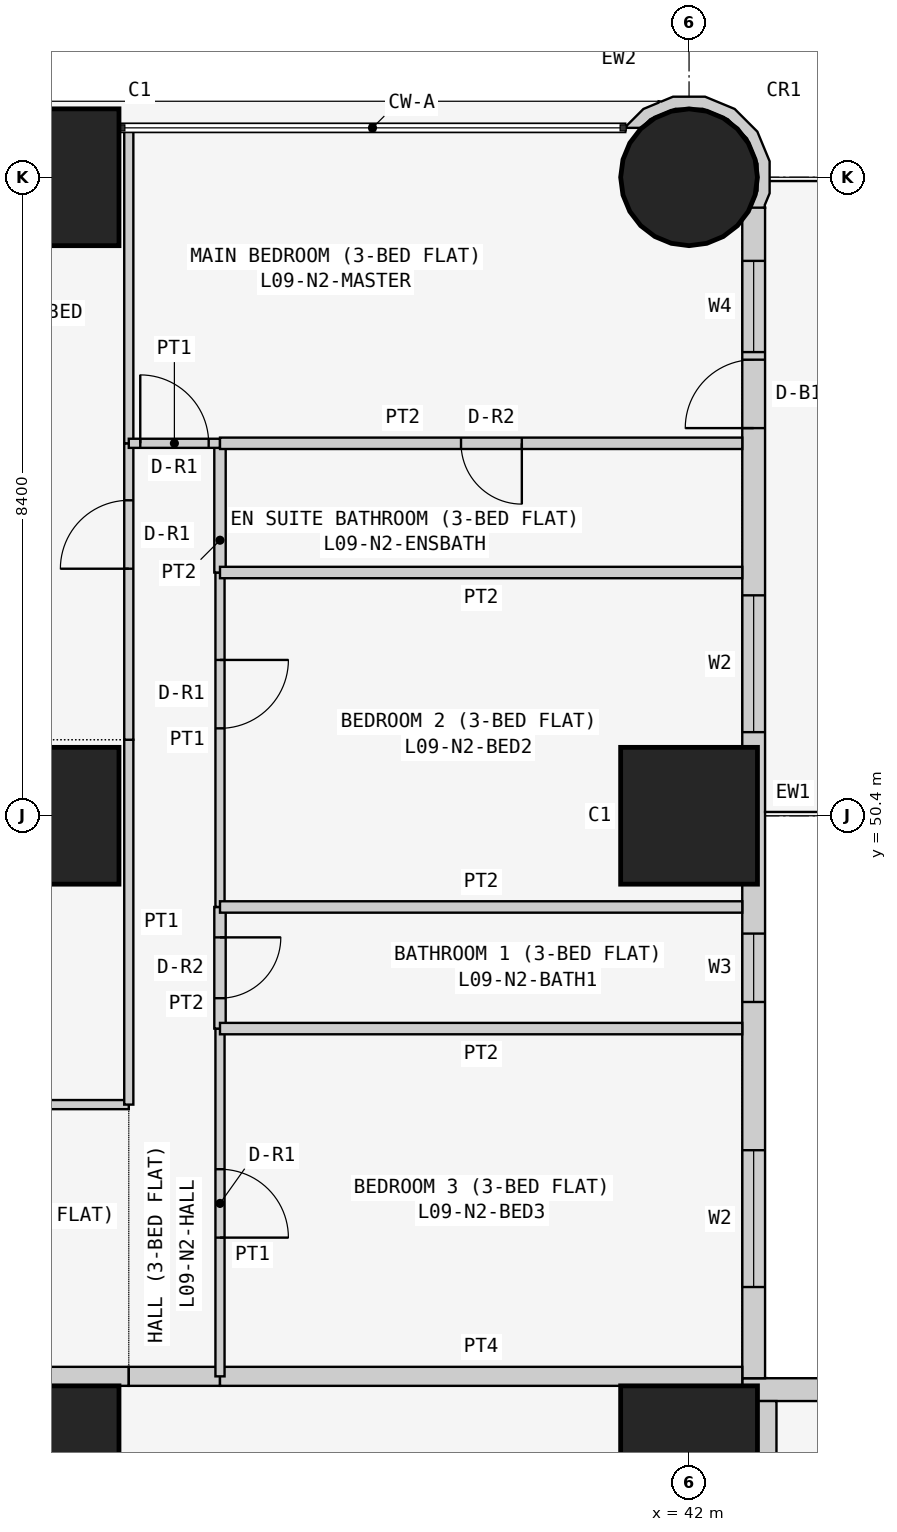
"""IFC4 building model, lengths in metres.
Left out: names, types, materials, properties, quantities, classifications, styles, units other than length and angle.
Written with IfcOpenShell. Run it as: python <this file> out.ifc"""

import sys

from ifc_helpers import new_model, si_unit, direction, frame, frame_2d, origin, origin_2d, place, context, subcontext, project, spatial, polyline, rectangle, circle, outline, extrude, element, fill, save


model = new_model("IFC4")
c1 = context("Model", 3, precision=1e-05, world=origin(), true_north=direction((0.0, 1.0)))
c2 = subcontext(c1, "Body", "Model", "MODEL_VIEW")
j1 = project(units=[si_unit("LENGTHUNIT", "METRE"), si_unit("PLANEANGLEUNIT", "RADIAN")], contexts=[c1])
p1 = place(None, origin())
s1 = spatial("IfcSite", under=j1, at=p1, CompositionType="ELEMENT")
p2 = place(p1, origin())
s2 = spatial("IfcBuilding", under=s1, at=p2, CompositionType="ELEMENT")
p3 = place(p2, frame((0.0, 0.0, 41.7)))
s3 = spatial("IfcBuildingStorey", under=s2, at=p3, CompositionType="ELEMENT", Elevation=41.7)
for number, where, z_axis, x_axis in (
    (1, (33.6, 42.0, 0.0), (0.0, 0.0, 1.0), (1.0, 0.0, 0.0)),
    (2, (33.6, 50.4, 0.0), (0.0, 0.0, 1.0), (1.0, 0.0, 0.0)),
    (3, (33.6, 58.8, 0.0), (0.0, 0.0, 1.0), (1.0, 0.0, 0.0)),
    (4, (42.0, 42.0, 0.0), (0.0, 0.0, 1.0), (1.0, 0.0, 0.0)),
    (5, (42.0, 50.4, 0.0), (0.0, 0.0, 1.0), (1.0, 0.0, 0.0)),
):
    element("IfcColumn", number, at=place(p3, frame(where, z_axis=z_axis, x_axis=x_axis)), inside=s3, PredefinedType="COLUMN", context=c2, shape_type="SweptSolid", body=[
        extrude(rectangle(XDim=1.8, YDim=1.8, at=origin_2d()), origin(), (0.0, 0.0, 1.0), 3.6),
    ])
p4 = place(p3, frame((42.0, 58.8, 0.0), z_axis=(0.0, 0.0, 1.0), x_axis=(1.0, 0.0, 0.0)))
e6 = element("IfcColumn", 6, at=p4, inside=s3, PredefinedType="COLUMN", context=c2, shape_type="SweptSolid", body=[
    extrude(circle(Radius=0.9, at=origin_2d()), origin(), (0.0, 0.0, 1.0), 3.6),
])
p5 = place(p3, frame((58.4, 42.85, 0.0), z_axis=(0.0, 0.0, 1.0), x_axis=(-1.0, 0.0, 0.0)))
e7 = element("IfcWall", 7, at=p5, inside=s3, PredefinedType="SOLIDWALL", context=c2, shape_type="SweptSolid", body=[
    extrude(rectangle(XDim=15.7, YDim=0.3, at=frame_2d((7.85, 0.0))), origin(), (0.0, 0.0, 1.0), 3.45),
])
p6 = place(p5, frame((12.4, 0.0, 0.9)))
e8 = element("IfcOpeningElement", 8, at=p6, cuts=e7, PredefinedType="OPENING", context=c2, shape_type="SweptSolid", body=[
    extrude(rectangle(XDim=1.8, YDim=1.5, at=frame_2d((0.9, 0.75))), frame((0.0, 0.16, 0.0), z_axis=(0.0, -1.0, 0.0), x_axis=(1.0, 0.0, 0.0)), (0.0, 0.0, 1.0), 0.32),
])
p7 = place(p5, frame((9.55, 0.0, 1.5)))
e9 = element("IfcOpeningElement", 9, at=p7, cuts=e7, PredefinedType="OPENING", context=c2, shape_type="SweptSolid", body=[
    extrude(rectangle(XDim=0.9, YDim=0.7, at=frame_2d((0.45, 0.35))), frame((0.0, 0.16, 0.0), z_axis=(0.0, -1.0, 0.0), x_axis=(1.0, 0.0, 0.0)), (0.0, 0.0, 1.0), 0.32),
])
p8 = place(p5, frame((5.1, 0.0, 0.9)))
e10 = element("IfcOpeningElement", 10, at=p8, cuts=e7, PredefinedType="OPENING", context=c2, shape_type="SweptSolid", body=[
    extrude(rectangle(XDim=1.8, YDim=1.5, at=frame_2d((0.9, 0.75))), frame((0.0, 0.16, 0.0), z_axis=(0.0, -1.0, 0.0), x_axis=(1.0, 0.0, 0.0)), (0.0, 0.0, 1.0), 0.32),
])
p9 = place(p5, frame((2.0, 0.0, 0.0)))
e11 = element("IfcOpeningElement", 11, at=p9, cuts=e7, PredefinedType="OPENING", context=c2, shape_type="SweptSolid", body=[
    extrude(rectangle(XDim=0.9, YDim=2.4, at=frame_2d((0.45, 1.2))), frame((0.0, 0.16, 0.0), z_axis=(0.0, -1.0, 0.0), x_axis=(1.0, 0.0, 0.0)), (0.0, 0.0, 1.0), 0.32),
])
p10 = place(p5, frame((0.7, 0.0, 0.9)))
e12 = element("IfcOpeningElement", 12, at=p10, cuts=e7, PredefinedType="OPENING", context=c2, shape_type="SweptSolid", body=[
    extrude(rectangle(XDim=1.2, YDim=1.5, at=frame_2d((0.6, 0.75))), frame((0.0, 0.16, 0.0), z_axis=(0.0, -1.0, 0.0), x_axis=(1.0, 0.0, 0.0)), (0.0, 0.0, 1.0), 0.32),
])
p11 = place(p3, frame((42.85, 43.0, 0.0), z_axis=(0.0, 0.0, 1.0), x_axis=(0.0, 1.0, 0.0)))
e13 = element("IfcWall", 13, at=p11, inside=s3, PredefinedType="SOLIDWALL", context=c2, shape_type="SweptSolid", body=[
    extrude(rectangle(XDim=15.4, YDim=0.3, at=frame_2d((7.7, 0.0))), origin(), (0.0, 0.0, 1.0), 3.45),
])
p12 = place(p11, frame((1.2, 0.0, 0.9)))
e14 = element("IfcOpeningElement", 14, at=p12, cuts=e13, PredefinedType="OPENING", context=c2, shape_type="SweptSolid", body=[
    extrude(rectangle(XDim=1.8, YDim=1.5, at=frame_2d((0.9, 0.75))), frame((0.0, 0.16, 0.0), z_axis=(0.0, -1.0, 0.0), x_axis=(1.0, 0.0, 0.0)), (0.0, 0.0, 1.0), 0.32),
])
p13 = place(p11, frame((4.95, 0.0, 1.5)))
e15 = element("IfcOpeningElement", 15, at=p13, cuts=e13, PredefinedType="OPENING", context=c2, shape_type="SweptSolid", body=[
    extrude(rectangle(XDim=0.9, YDim=0.7, at=frame_2d((0.45, 0.35))), frame((0.0, 0.16, 0.0), z_axis=(0.0, -1.0, 0.0), x_axis=(1.0, 0.0, 0.0)), (0.0, 0.0, 1.0), 0.32),
])
p14 = place(p11, frame((8.5, 0.0, 0.9)))
e16 = element("IfcOpeningElement", 16, at=p14, cuts=e13, PredefinedType="OPENING", context=c2, shape_type="SweptSolid", body=[
    extrude(rectangle(XDim=1.8, YDim=1.5, at=frame_2d((0.9, 0.75))), frame((0.0, 0.16, 0.0), z_axis=(0.0, -1.0, 0.0), x_axis=(1.0, 0.0, 0.0)), (0.0, 0.0, 1.0), 0.32),
])
p15 = place(p11, frame((12.5, 0.0, 0.0)))
e17 = element("IfcOpeningElement", 17, at=p15, cuts=e13, PredefinedType="OPENING", context=c2, shape_type="SweptSolid", body=[
    extrude(rectangle(XDim=0.9, YDim=2.4, at=frame_2d((0.45, 1.2))), frame((0.0, 0.16, 0.0), z_axis=(0.0, -1.0, 0.0), x_axis=(1.0, 0.0, 0.0)), (0.0, 0.0, 1.0), 0.32),
])
p16 = place(p11, frame((13.5, 0.0, 0.9)))
e18 = element("IfcOpeningElement", 18, at=p16, cuts=e13, PredefinedType="OPENING", context=c2, shape_type="SweptSolid", body=[
    extrude(rectangle(XDim=1.2, YDim=1.5, at=frame_2d((0.6, 0.75))), frame((0.0, 0.16, 0.0), z_axis=(0.0, -1.0, 0.0), x_axis=(1.0, 0.0, 0.0)), (0.0, 0.0, 1.0), 0.32),
])
p17 = place(p3, frame((42.91, 58.436, 0.0), z_axis=(0.0, 0.0, 1.0), x_axis=(0.377204953059, 0.926129809145, 0.0)))
e19 = element("IfcWall", 19, at=p17, inside=s3, PredefinedType="SOLIDWALL", context=c2, shape_type="SweptSolid", body=[
    extrude(outline(polyline([(0.769, 1.728), (0.75, 1.723), (0.6, 1.875), (0.295, 2.004), (0.281, 1.998), (0.36, 1.803), (0.509, 1.741), (0.761, 1.486), (0.896, 1.154), (0.894, 0.795), (0.755, 0.465), (0.5, 0.213), (0.168, 0.078), (-0.1, 0.08), (0.001, -0.097), (0.03, -0.08), (0.198, -0.081), (0.589, 0.078), (0.889, 0.374), (1.052, 0.763), (1.055, 1.185), (0.896, 1.575), (0.778, 1.695), (0.769, 1.728)])), origin(), (0.0, 0.0, 1.0), 3.45),
])
p18 = place(p3, frame((29.4, 43.025, 0.0), z_axis=(0.0, 0.0, 1.0), x_axis=(1.0, 0.0, 0.0)))
e20 = element("IfcWall", 20, at=p18, inside=s3, PredefinedType="PARTITIONING", context=c2, shape_type="SweptSolid", body=[
    extrude(rectangle(XDim=5.229, YDim=0.25, at=frame_2d((2.615, 0.0))), origin(), (0.0, 0.0, 1.0), 3.45),
])
p19 = place(p18, frame((2.1, 0.0, 0.0)))
e21 = element("IfcOpeningElement", 21, at=p19, cuts=e20, PredefinedType="OPENING", context=c2, shape_type="SweptSolid", body=[
    extrude(rectangle(XDim=1.0, YDim=2.1, at=frame_2d((0.5, 1.05))), frame((0.0, 0.135, 0.0), z_axis=(0.0, -1.0, 0.0), x_axis=(1.0, 0.0, 0.0)), (0.0, 0.0, 1.0), 0.27),
])
p20 = place(p3, frame((34.629, 43.025, 0.0), z_axis=(0.0, 0.0, 1.0), x_axis=(1.0, 0.0, 0.0)))
e22 = element("IfcWall", 22, at=p20, inside=s3, PredefinedType="PARTITIONING", context=c2, shape_type="SweptSolid", body=[
    extrude(rectangle(XDim=1.2, YDim=0.25, at=frame_2d((0.6, 0.0))), origin(), (0.0, 0.0, 1.0), 3.45),
])
for number, where, z_axis, x_axis in (
    (23, (35.829, 43.025, 0.0), (0.0, 0.0, 1.0), (1.0, 0.0, 0.0)),
    (24, (43.025, 42.7, 0.0), (0.0, 0.0, 1.0), (0.0, -1.0, 0.0)),
):
    element("IfcWall", number, at=place(p3, frame(where, z_axis=z_axis, x_axis=x_axis)), inside=s3, PredefinedType="PARTITIONING", context=c2, shape_type="SweptSolid", body=[
        extrude(rectangle(XDim=6.871, YDim=0.25, at=frame_2d((3.436, 0.0))), origin(), (0.0, 0.0, 1.0), 3.45),
    ])
p21 = place(p3, frame((29.4, 46.6, 0.0), z_axis=(0.0, 0.0, 1.0), x_axis=(1.0, 0.0, 0.0)))
e25 = element("IfcWall", 25, at=p21, inside=s3, PredefinedType="PARTITIONING", context=c2, shape_type="SweptSolid", body=[
    extrude(rectangle(XDim=5.229, YDim=0.12, at=frame_2d((2.615, 0.0))), origin(), (0.0, 0.0, 1.0), 3.45),
])
p22 = place(p21, frame((1.05, 0.0, 0.0)))
e26 = element("IfcOpeningElement", 26, at=p22, cuts=e25, PredefinedType="OPENING", context=c2, shape_type="SweptSolid", body=[
    extrude(rectangle(XDim=0.9, YDim=2.1, at=frame_2d((0.45, 1.05))), frame((0.0, 0.07, 0.0), z_axis=(0.0, -1.0, 0.0), x_axis=(1.0, 0.0, 0.0)), (0.0, 0.0, 1.0), 0.14),
])
p23 = place(p3, frame((34.629, 51.4, 0.0), z_axis=(0.0, 0.0, 1.0), x_axis=(0.0, -1.0, 0.0)))
e27 = element("IfcWall", 27, at=p23, inside=s3, PredefinedType="PARTITIONING", context=c2, shape_type="SweptSolid", body=[
    extrude(rectangle(XDim=4.8, YDim=0.12, at=frame_2d((2.4, 0.0))), origin(), (0.0, 0.0, 1.0), 3.45),
])
p24 = place(p3, frame((34.629, 55.3, 0.0), z_axis=(0.0, 0.0, 1.0), x_axis=(0.0, -1.0, 0.0)))
e28 = element("IfcWall", 28, at=p24, inside=s3, PredefinedType="PARTITIONING", context=c2, shape_type="SweptSolid", body=[
    extrude(rectangle(XDim=3.9, YDim=0.12, at=frame_2d((1.95, 0.0))), origin(), (0.0, 0.0, 1.0), 3.45),
])
p25 = place(p24, frame((0.75, 0.0, 0.0)))
e29 = element("IfcOpeningElement", 29, at=p25, cuts=e28, PredefinedType="OPENING", context=c2, shape_type="SweptSolid", body=[
    extrude(rectangle(XDim=0.9, YDim=2.1, at=frame_2d((0.45, 1.05))), frame((0.0, 0.07, 0.0), z_axis=(0.0, -1.0, 0.0), x_axis=(1.0, 0.0, 0.0)), (0.0, 0.0, 1.0), 0.14),
])
p26 = place(p3, frame((34.629, 59.45, 0.0), z_axis=(0.0, 0.0, 1.0), x_axis=(0.0, -1.0, 0.0)))
e30 = element("IfcWall", 30, at=p26, inside=s3, PredefinedType="PARTITIONING", context=c2, shape_type="SweptSolid", body=[
    extrude(rectangle(XDim=4.15, YDim=0.12, at=frame_2d((2.075, 0.0))), origin(), (0.0, 0.0, 1.0), 3.45),
])
p27 = place(p3, frame((35.829, 47.6, 0.0), z_axis=(0.0, 0.0, 1.0), x_axis=(0.0, -1.0, 0.0)))
e31 = element("IfcWall", 31, at=p27, inside=s3, PredefinedType="PARTITIONING", context=c2, shape_type="SweptSolid", body=[
    extrude(rectangle(XDim=4.575, YDim=0.12, at=frame_2d((2.288, 0.0))), origin(), (0.0, 0.0, 1.0), 3.45),
])
p28 = place(p27, frame((1.85, 0.0, 0.0)))
e32 = element("IfcOpeningElement", 32, at=p28, cuts=e31, PredefinedType="OPENING", context=c2, shape_type="SweptSolid", body=[
    extrude(rectangle(XDim=0.9, YDim=2.1, at=frame_2d((0.45, 1.05))), frame((0.0, 0.07, 0.0), z_axis=(0.0, -1.0, 0.0), x_axis=(1.0, 0.0, 0.0)), (0.0, 0.0, 1.0), 0.14),
])
p29 = place(p3, frame((35.829, 49.2, 0.0), z_axis=(0.0, 0.0, 1.0), x_axis=(0.0, -1.0, 0.0)))
e33 = element("IfcWall", 33, at=p29, inside=s3, PredefinedType="PARTITIONING", context=c2, shape_type="SweptSolid", body=[
    extrude(rectangle(XDim=1.6, YDim=0.15, at=frame_2d((0.8, 0.0))), origin(), (0.0, 0.0, 1.0), 3.45),
])
p30 = place(p29, frame((0.4, 0.0, 0.0)))
e34 = element("IfcOpeningElement", 34, at=p30, cuts=e33, PredefinedType="OPENING", context=c2, shape_type="SweptSolid", body=[
    extrude(rectangle(XDim=0.8, YDim=2.1, at=frame_2d((0.4, 1.05))), frame((0.0, 0.085, 0.0), z_axis=(0.0, -1.0, 0.0), x_axis=(1.0, 0.0, 0.0)), (0.0, 0.0, 1.0), 0.17),
])
p31 = place(p3, frame((35.829, 53.6, 0.0), z_axis=(0.0, 0.0, 1.0), x_axis=(0.0, -1.0, 0.0)))
e35 = element("IfcWall", 35, at=p31, inside=s3, PredefinedType="PARTITIONING", context=c2, shape_type="SweptSolid", body=[
    extrude(rectangle(XDim=4.4, YDim=0.12, at=frame_2d((2.2, 0.0))), origin(), (0.0, 0.0, 1.0), 3.45),
])
p32 = place(p31, frame((1.15, 0.0, 0.0)))
e36 = element("IfcOpeningElement", 36, at=p32, cuts=e35, PredefinedType="OPENING", context=c2, shape_type="SweptSolid", body=[
    extrude(rectangle(XDim=0.9, YDim=2.1, at=frame_2d((0.45, 1.05))), frame((0.0, 0.07, 0.0), z_axis=(0.0, -1.0, 0.0), x_axis=(1.0, 0.0, 0.0)), (0.0, 0.0, 1.0), 0.14),
])
p33 = place(p3, frame((35.829, 55.3, 0.0), z_axis=(0.0, 0.0, 1.0), x_axis=(0.0, -1.0, 0.0)))
e37 = element("IfcWall", 37, at=p33, inside=s3, PredefinedType="PARTITIONING", context=c2, shape_type="SweptSolid", body=[
    extrude(rectangle(XDim=1.7, YDim=0.15, at=frame_2d((0.85, 0.0))), origin(), (0.0, 0.0, 1.0), 3.45),
])
p34 = place(p3, frame((34.629, 55.3, 0.0), z_axis=(0.0, 0.0, 1.0), x_axis=(1.0, 0.0, 0.0)))
e38 = element("IfcWall", 38, at=p34, inside=s3, PredefinedType="PARTITIONING", context=c2, shape_type="SweptSolid", body=[
    extrude(rectangle(XDim=1.2, YDim=0.12, at=frame_2d((0.6, 0.0))), origin(), (0.0, 0.0, 1.0), 3.45),
])
p35 = place(p34, frame((0.151, 0.0, 0.0)))
e39 = element("IfcOpeningElement", 39, at=p35, cuts=e38, PredefinedType="OPENING", context=c2, shape_type="SweptSolid", body=[
    extrude(rectangle(XDim=0.9, YDim=2.1, at=frame_2d((0.45, 1.05))), frame((0.0, 0.07, 0.0), z_axis=(0.0, -1.0, 0.0), x_axis=(1.0, 0.0, 0.0)), (0.0, 0.0, 1.0), 0.14),
])
for number, where, z_axis, x_axis in (
    (40, (35.829, 47.6, 0.0), (0.0, 0.0, 1.0), (1.0, 0.0, 0.0)),
    (41, (35.829, 49.2, 0.0), (0.0, 0.0, 1.0), (1.0, 0.0, 0.0)),
    (42, (35.829, 53.6, 0.0), (0.0, 0.0, 1.0), (1.0, 0.0, 0.0)),
):
    element("IfcWall", number, at=place(p3, frame(where, z_axis=z_axis, x_axis=x_axis)), inside=s3, PredefinedType="PARTITIONING", context=c2, shape_type="SweptSolid", body=[
        extrude(rectangle(XDim=6.871, YDim=0.15, at=frame_2d((3.436, 0.0))), origin(), (0.0, 0.0, 1.0), 3.45),
    ])
p36 = place(p3, frame((35.829, 55.3, 0.0), z_axis=(0.0, 0.0, 1.0), x_axis=(1.0, 0.0, 0.0)))
e43 = element("IfcWall", 43, at=p36, inside=s3, PredefinedType="PARTITIONING", context=c2, shape_type="SweptSolid", body=[
    extrude(rectangle(XDim=6.871, YDim=0.15, at=frame_2d((3.436, 0.0))), origin(), (0.0, 0.0, 1.0), 3.45),
])
p37 = place(p36, frame((3.171, 0.0, 0.0)))
e44 = element("IfcOpeningElement", 44, at=p37, cuts=e43, PredefinedType="OPENING", context=c2, shape_type="SweptSolid", body=[
    extrude(rectangle(XDim=0.8, YDim=2.1, at=frame_2d((0.4, 1.05))), frame((0.0, 0.085, 0.0), z_axis=(0.0, -1.0, 0.0), x_axis=(1.0, 0.0, 0.0)), (0.0, 0.0, 1.0), 0.17),
])
p38 = place(p12, origin())
e45 = element("IfcWindow", 45, at=p38, inside=s3, PartitioningType="SINGLE_PANEL", PredefinedType="WINDOW", context=c2, shape_type="SweptSolid", body=[
    extrude(rectangle(XDim=1.8, YDim=1.5, at=frame_2d((0.9, 0.75))), frame((0.0, 0.03, 0.0), z_axis=(0.0, -1.0, 0.0), x_axis=(1.0, 0.0, 0.0)), (0.0, 0.0, 1.0), 0.06),
])
fill(e14, e45)
p39 = place(p13, origin())
e46 = element("IfcWindow", 46, at=p39, inside=s3, PartitioningType="SINGLE_PANEL", PredefinedType="WINDOW", context=c2, shape_type="SweptSolid", body=[
    extrude(rectangle(XDim=0.9, YDim=0.7, at=frame_2d((0.45, 0.35))), frame((0.0, 0.03, 0.0), z_axis=(0.0, -1.0, 0.0), x_axis=(1.0, 0.0, 0.0)), (0.0, 0.0, 1.0), 0.06),
])
fill(e15, e46)
p40 = place(p14, origin())
e47 = element("IfcWindow", 47, at=p40, inside=s3, PartitioningType="SINGLE_PANEL", PredefinedType="WINDOW", context=c2, shape_type="SweptSolid", body=[
    extrude(rectangle(XDim=1.8, YDim=1.5, at=frame_2d((0.9, 0.75))), frame((0.0, 0.03, 0.0), z_axis=(0.0, -1.0, 0.0), x_axis=(1.0, 0.0, 0.0)), (0.0, 0.0, 1.0), 0.06),
])
fill(e16, e47)
p41 = place(p15, origin())
e48 = element("IfcDoor", 48, at=p41, inside=s3, OperationType="SINGLE_SWING_LEFT", PredefinedType="DOOR", context=c2, shape_type="SweptSolid", body=[
    extrude(rectangle(XDim=0.9, YDim=2.4, at=frame_2d((0.45, 1.2))), frame((0.0, 0.025, 0.0), z_axis=(0.0, -1.0, 0.0), x_axis=(1.0, 0.0, 0.0)), (0.0, 0.0, 1.0), 0.05),
])
fill(e17, e48)
p42 = place(p16, origin())
e49 = element("IfcWindow", 49, at=p42, inside=s3, PartitioningType="SINGLE_PANEL", PredefinedType="WINDOW", context=c2, shape_type="SweptSolid", body=[
    extrude(rectangle(XDim=1.2, YDim=1.5, at=frame_2d((0.6, 0.75))), frame((0.0, 0.03, 0.0), z_axis=(0.0, -1.0, 0.0), x_axis=(1.0, 0.0, 0.0)), (0.0, 0.0, 1.0), 0.06),
])
fill(e18, e49)
p43 = place(p25, frame((0.9, 0.0, 0.0), z_axis=(0.0, 0.0, 1.0), x_axis=(-1.0, 0.0, 0.0)))
e50 = element("IfcDoor", 50, at=p43, inside=s3, OperationType="SINGLE_SWING_LEFT", PredefinedType="DOOR", context=c2, shape_type="SweptSolid", body=[
    extrude(rectangle(XDim=0.9, YDim=2.1, at=frame_2d((0.45, 1.05))), frame((0.0, 0.025, 0.0), z_axis=(0.0, -1.0, 0.0), x_axis=(1.0, 0.0, 0.0)), (0.0, 0.0, 1.0), 0.05),
])
fill(e29, e50)
p44 = place(p28, origin())
e51 = element("IfcDoor", 51, at=p44, inside=s3, OperationType="SINGLE_SWING_RIGHT", PredefinedType="DOOR", context=c2, shape_type="SweptSolid", body=[
    extrude(rectangle(XDim=0.9, YDim=2.1, at=frame_2d((0.45, 1.05))), frame((0.0, 0.025, 0.0), z_axis=(0.0, -1.0, 0.0), x_axis=(1.0, 0.0, 0.0)), (0.0, 0.0, 1.0), 0.05),
])
fill(e32, e51)
p45 = place(p30, origin())
e52 = element("IfcDoor", 52, at=p45, inside=s3, OperationType="SINGLE_SWING_LEFT", PredefinedType="DOOR", context=c2, shape_type="SweptSolid", body=[
    extrude(rectangle(XDim=0.8, YDim=2.1, at=frame_2d((0.4, 1.05))), frame((0.0, 0.025, 0.0), z_axis=(0.0, -1.0, 0.0), x_axis=(1.0, 0.0, 0.0)), (0.0, 0.0, 1.0), 0.05),
])
fill(e34, e52)
p46 = place(p32, origin())
e53 = element("IfcDoor", 53, at=p46, inside=s3, OperationType="SINGLE_SWING_LEFT", PredefinedType="DOOR", context=c2, shape_type="SweptSolid", body=[
    extrude(rectangle(XDim=0.9, YDim=2.1, at=frame_2d((0.45, 1.05))), frame((0.0, 0.025, 0.0), z_axis=(0.0, -1.0, 0.0), x_axis=(1.0, 0.0, 0.0)), (0.0, 0.0, 1.0), 0.05),
])
fill(e36, e53)
p47 = place(p35, origin())
e54 = element("IfcDoor", 54, at=p47, inside=s3, OperationType="SINGLE_SWING_LEFT", PredefinedType="DOOR", context=c2, shape_type="SweptSolid", body=[
    extrude(rectangle(XDim=0.9, YDim=2.1, at=frame_2d((0.45, 1.05))), frame((0.0, 0.025, 0.0), z_axis=(0.0, -1.0, 0.0), x_axis=(1.0, 0.0, 0.0)), (0.0, 0.0, 1.0), 0.05),
])
fill(e39, e54)
p48 = place(p37, frame((0.8, 0.0, 0.0), z_axis=(0.0, 0.0, 1.0), x_axis=(-1.0, 0.0, 0.0)))
e55 = element("IfcDoor", 55, at=p48, inside=s3, OperationType="SINGLE_SWING_LEFT", PredefinedType="DOOR", context=c2, shape_type="SweptSolid", body=[
    extrude(rectangle(XDim=0.8, YDim=2.1, at=frame_2d((0.4, 1.05))), frame((0.0, 0.025, 0.0), z_axis=(0.0, -1.0, 0.0), x_axis=(1.0, 0.0, 0.0)), (0.0, 0.0, 1.0), 0.05),
])
fill(e44, e55)
save(model, sys.argv[1])
